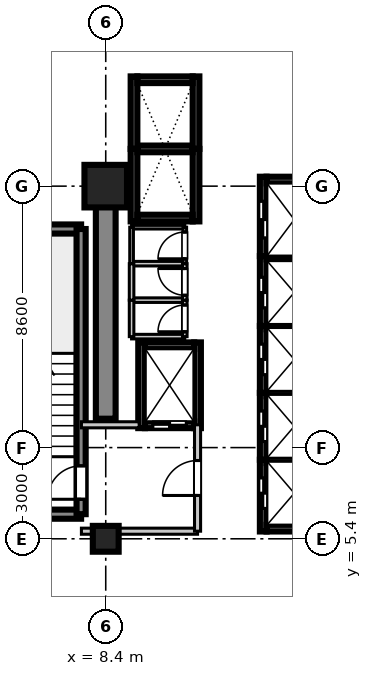
"""IFC4 building model, lengths in metres.
Left out: names, types, materials, properties, quantities, classifications, styles, units other than length and angle.
Written with IfcOpenShell. Run it as: python <this file> out.ifc"""

import sys

from ifc_helpers import new_model, si_unit, direction, frame, frame_2d, origin, origin_2d, place, context, subcontext, project, spatial, rectangle, extrude, source, transform, mapped, element, fill, save


model = new_model("IFC4")
c1 = context("Model", 3, precision=1e-05, world=origin(), true_north=direction((0.0, 1.0)))
c2 = subcontext(c1, "Body", "Model", "MODEL_VIEW")
j1 = project(units=[si_unit("LENGTHUNIT", "METRE"), si_unit("PLANEANGLEUNIT", "RADIAN")], contexts=[c1])
p1 = place(None, origin())
s1 = spatial("IfcSite", under=j1, at=p1, CompositionType="ELEMENT")
p2 = place(p1, origin())
s2 = spatial("IfcBuilding", under=s1, at=p2, CompositionType="ELEMENT")
p3 = place(p2, frame((0.0, 0.0, 76.2)))
s3 = spatial("IfcBuildingStorey", under=s2, at=p3, CompositionType="ELEMENT", Elevation=76.2)
m1 = source(origin(), c2, "Body", "SweptSolid", [
    extrude(rectangle(XDim=0.85, YDim=0.85, at=origin_2d()), origin(), (0.0, 0.0, 1.0), 3.605),
])
p4 = place(p3, frame((8.4, 5.4, 0.0), z_axis=(0.0, 0.0, 1.0), x_axis=(1.0, 0.0, 0.0)))
e1 = element("IfcColumn", 1, at=p4, inside=s3, PredefinedType="PILASTER", context=c2, shape_type="MappedRepresentation", body=[
    mapped(m1, transform((0.0, 0.0, 0.0), scale=1.0)),
])
m2 = source(origin(), c2, "Body", "SweptSolid", [
    extrude(rectangle(XDim=1.4, YDim=1.4, at=origin_2d()), origin(), (0.0, 0.0, 1.0), 3.605),
])
p5 = place(p3, frame((8.4, 17.0, 0.0), z_axis=(0.0, 0.0, 1.0), x_axis=(1.0, 0.0, 0.0)))
e2 = element("IfcColumn", 2, at=p5, inside=s3, PredefinedType="COLUMN", context=c2, shape_type="MappedRepresentation", body=[
    mapped(m2, transform((0.0, 0.0, 0.0), scale=1.0)),
])
m3 = source(origin(), c2, "Body", "SweptSolid", [
    extrude(rectangle(XDim=7.65, YDim=0.65, at=frame_2d((3.825, 0.0))), origin(), (0.0, 0.0, 1.0), 3.37),
])
p6 = place(p3, frame((8.4, 9.35, 0.0), z_axis=(0.0, 0.0, 1.0), x_axis=(0.0, 1.0, 0.0)))
e3 = element("IfcWall", 3, at=p6, inside=s3, PredefinedType="SHEAR", context=c2, shape_type="MappedRepresentation", body=[
    mapped(m3, transform((0.0, 0.0, 0.0), scale=1.0)),
])
m4 = source(origin(), c2, "Body", "SweptSolid", [
    extrude(rectangle(XDim=3.98, YDim=0.3, at=frame_2d((1.99, 0.0))), origin(), (0.0, 0.0, 1.0), 3.37),
])
for number, where, z_axis, x_axis in (
    (4, (3.61, 6.21, 0.0), (0.0, 0.0, 1.0), (1.0, 0.0, 0.0)),
    (5, (3.61, 15.59, 0.0), (0.0, 0.0, 1.0), (1.0, 0.0, 0.0)),
):
    element("IfcWall", number, at=place(p3, frame(where, z_axis=z_axis, x_axis=x_axis)), inside=s3, PredefinedType="SHEAR", context=c2, shape_type="MappedRepresentation", body=[
        mapped(m4, transform((0.0, 0.0, 0.0), scale=1.0)),
    ])
m5 = source(origin(), c2, "Body", "SweptSolid", [
    extrude(rectangle(XDim=9.38, YDim=0.3, at=frame_2d((4.69, 0.0))), origin(), (0.0, 0.0, 1.0), 3.37),
])
p7 = place(p3, frame((7.59, 6.21, 0.0), z_axis=(0.0, 0.0, 1.0), x_axis=(0.0, 1.0, 0.0)))
e6 = element("IfcWall", 6, at=p7, inside=s3, PredefinedType="SHEAR", context=c2, shape_type="MappedRepresentation", body=[
    mapped(m5, transform((0.0, 0.0, 0.0), scale=1.0)),
])
p8 = place(p7, frame((0.49, 0.0, 0.0)))
e7 = element("IfcOpeningElement", 7, at=p8, cuts=e6, PredefinedType="OPENING", context=c2, shape_type="SweptSolid", body=[
    extrude(rectangle(XDim=1.1, YDim=2.15, at=frame_2d((0.55, 1.075))), frame((0.0, 0.16, 0.0), z_axis=(0.0, -1.0, 0.0), x_axis=(1.0, 0.0, 0.0)), (0.0, 0.0, 1.0), 0.32),
])
m6 = source(origin(), c2, "Body", "SweptSolid", [
    extrude(rectangle(XDim=2.36, YDim=0.22, at=frame_2d((1.18, 0.0))), origin(), (0.0, 0.0, 1.0), 3.37),
])
p9 = place(p3, frame((13.58, 5.64, 0.0), z_axis=(0.0, 0.0, 1.0), x_axis=(0.0, 1.0, 0.0)))
e8 = element("IfcWall", 8, at=p9, inside=s3, PredefinedType="SHEAR", context=c2, shape_type="MappedRepresentation", body=[
    mapped(m6, transform((0.0, 0.0, 0.0), scale=1.0)),
])
p10 = place(p9, frame((0.76, 0.0, 0.0)))
e9 = element("IfcOpeningElement", 9, at=p10, cuts=e8, PredefinedType="OPENING", context=c2, shape_type="SweptSolid", body=[
    extrude(rectangle(XDim=1.0, YDim=2.2, at=frame_2d((0.5, 1.1))), frame((0.0, 0.12, 0.0), z_axis=(0.0, -1.0, 0.0), x_axis=(1.0, 0.0, 0.0)), (0.0, 0.0, 1.0), 0.24),
])
m7 = source(origin(), c2, "Body", "SweptSolid", [
    extrude(rectangle(XDim=1.82, YDim=0.22, at=frame_2d((0.91, 0.0))), origin(), (0.0, 0.0, 1.0), 3.37),
])
p11 = place(p3, frame((13.69, 5.75, 0.0), z_axis=(0.0, 0.0, 1.0), x_axis=(1.0, 0.0, 0.0)))
e10 = element("IfcWall", 10, at=p11, inside=s3, PredefinedType="SHEAR", context=c2, shape_type="MappedRepresentation", body=[
    mapped(m7, transform((0.0, 0.0, 0.0), scale=1.0)),
])
m8 = source(origin(), c2, "Body", "SweptSolid", [
    extrude(rectangle(XDim=1.82, YDim=0.22, at=frame_2d((0.91, 0.0))), origin(), (0.0, 0.0, 1.0), 3.65),
])
p12 = place(p3, frame((13.69, 8.0, 0.0), z_axis=(0.0, 0.0, 1.0), x_axis=(1.0, 0.0, 0.0)))
e11 = element("IfcWall", 11, at=p12, inside=s3, PredefinedType="SHEAR", context=c2, shape_type="MappedRepresentation", body=[
    mapped(m8, transform((0.0, 0.0, 0.0), scale=1.0)),
])
m9 = source(origin(), c2, "Body", "SweptSolid", [
    extrude(rectangle(XDim=2.2, YDim=0.22, at=frame_2d((1.1, 0.0))), origin(), (0.0, 0.0, 1.0), 3.37),
])
p13 = place(p3, frame((13.58, 8.0, 0.0), z_axis=(0.0, 0.0, 1.0), x_axis=(0.0, 1.0, 0.0)))
e12 = element("IfcWall", 12, at=p13, inside=s3, PredefinedType="SHEAR", context=c2, shape_type="MappedRepresentation", body=[
    mapped(m9, transform((0.0, 0.0, 0.0), scale=1.0)),
])
p14 = place(p13, frame((0.6, 0.0, 0.0)))
e13 = element("IfcOpeningElement", 13, at=p14, cuts=e12, PredefinedType="OPENING", context=c2, shape_type="SweptSolid", body=[
    extrude(rectangle(XDim=1.0, YDim=2.2, at=frame_2d((0.5, 1.1))), frame((0.0, 0.12, 0.0), z_axis=(0.0, -1.0, 0.0), x_axis=(1.0, 0.0, 0.0)), (0.0, 0.0, 1.0), 0.24),
])
p15 = place(p3, frame((13.69, 10.2, 0.0), z_axis=(0.0, 0.0, 1.0), x_axis=(1.0, 0.0, 0.0)))
e14 = element("IfcWall", 14, at=p15, inside=s3, PredefinedType="SHEAR", context=c2, shape_type="MappedRepresentation", body=[
    mapped(m8, transform((0.0, 0.0, 0.0), scale=1.0)),
])
p16 = place(p3, frame((13.58, 10.2, 0.0), z_axis=(0.0, 0.0, 1.0), x_axis=(0.0, 1.0, 0.0)))
e15 = element("IfcWall", 15, at=p16, inside=s3, PredefinedType="SHEAR", context=c2, shape_type="MappedRepresentation", body=[
    mapped(m9, transform((0.0, 0.0, 0.0), scale=1.0)),
])
p17 = place(p16, frame((0.6, 0.0, 0.0)))
e16 = element("IfcOpeningElement", 16, at=p17, cuts=e15, PredefinedType="OPENING", context=c2, shape_type="SweptSolid", body=[
    extrude(rectangle(XDim=1.0, YDim=2.2, at=frame_2d((0.5, 1.1))), frame((0.0, 0.12, 0.0), z_axis=(0.0, -1.0, 0.0), x_axis=(1.0, 0.0, 0.0)), (0.0, 0.0, 1.0), 0.24),
])
p18 = place(p3, frame((13.69, 12.4, 0.0), z_axis=(0.0, 0.0, 1.0), x_axis=(1.0, 0.0, 0.0)))
e17 = element("IfcWall", 17, at=p18, inside=s3, PredefinedType="SHEAR", context=c2, shape_type="MappedRepresentation", body=[
    mapped(m8, transform((0.0, 0.0, 0.0), scale=1.0)),
])
m10 = source(origin(), c2, "Body", "SweptSolid", [
    extrude(rectangle(XDim=2.3, YDim=0.22, at=frame_2d((1.15, 0.0))), origin(), (0.0, 0.0, 1.0), 3.37),
])
p19 = place(p3, frame((13.58, 12.4, 0.0), z_axis=(0.0, 0.0, 1.0), x_axis=(0.0, 1.0, 0.0)))
e18 = element("IfcWall", 18, at=p19, inside=s3, PredefinedType="SHEAR", context=c2, shape_type="MappedRepresentation", body=[
    mapped(m10, transform((0.0, 0.0, 0.0), scale=1.0)),
])
p20 = place(p19, frame((0.6, 0.0, 0.0)))
e19 = element("IfcOpeningElement", 19, at=p20, cuts=e18, PredefinedType="OPENING", context=c2, shape_type="SweptSolid", body=[
    extrude(rectangle(XDim=1.0, YDim=2.2, at=frame_2d((0.5, 1.1))), frame((0.0, 0.12, 0.0), z_axis=(0.0, -1.0, 0.0), x_axis=(1.0, 0.0, 0.0)), (0.0, 0.0, 1.0), 0.24),
])
p21 = place(p3, frame((13.69, 14.7, 0.0), z_axis=(0.0, 0.0, 1.0), x_axis=(1.0, 0.0, 0.0)))
e20 = element("IfcWall", 20, at=p21, inside=s3, PredefinedType="SHEAR", context=c2, shape_type="MappedRepresentation", body=[
    mapped(m8, transform((0.0, 0.0, 0.0), scale=1.0)),
])
m11 = source(origin(), c2, "Body", "SweptSolid", [
    extrude(rectangle(XDim=2.385, YDim=0.22, at=frame_2d((1.192, 0.0))), origin(), (0.0, 0.0, 1.0), 3.37),
])
for number, where, z_axis, x_axis in (
    (21, (9.33, 15.84, 0.0), (0.0, 0.0, 1.0), (0.0, 1.0, 0.0)),
    (22, (11.37, 15.84, 0.0), (0.0, 0.0, 1.0), (0.0, 1.0, 0.0)),
):
    element("IfcWall", number, at=place(p3, frame(where, z_axis=z_axis, x_axis=x_axis)), inside=s3, PredefinedType="SHEAR", context=c2, shape_type="MappedRepresentation", body=[
        mapped(m11, transform((0.0, 0.0, 0.0), scale=1.0)),
    ])
p22 = place(p3, frame((9.44, 15.95, 0.0), z_axis=(0.0, 0.0, 1.0), x_axis=(1.0, 0.0, 0.0)))
e23 = element("IfcWall", 23, at=p22, inside=s3, PredefinedType="SHEAR", context=c2, shape_type="MappedRepresentation", body=[
    mapped(m7, transform((0.0, 0.0, 0.0), scale=1.0)),
])
p23 = place(p3, frame((9.44, 18.225, 0.0), z_axis=(0.0, 0.0, 1.0), x_axis=(1.0, 0.0, 0.0)))
e24 = element("IfcWall", 24, at=p23, inside=s3, PredefinedType="SHEAR", context=c2, shape_type="MappedRepresentation", body=[
    mapped(m8, transform((0.0, 0.0, 0.0), scale=1.0)),
])
for number, where, z_axis, x_axis in (
    (25, (9.33, 18.225, 0.0), (0.0, 0.0, 1.0), (0.0, 1.0, 0.0)),
    (26, (11.37, 18.225, 0.0), (0.0, 0.0, 1.0), (0.0, 1.0, 0.0)),
):
    element("IfcWall", number, at=place(p3, frame(where, z_axis=z_axis, x_axis=x_axis)), inside=s3, PredefinedType="SHEAR", context=c2, shape_type="MappedRepresentation", body=[
        mapped(m11, transform((0.0, 0.0, 0.0), scale=1.0)),
    ])
p24 = place(p3, frame((9.44, 20.5, 0.0), z_axis=(0.0, 0.0, 1.0), x_axis=(1.0, 0.0, 0.0)))
e27 = element("IfcWall", 27, at=p24, inside=s3, PredefinedType="SHEAR", context=c2, shape_type="MappedRepresentation", body=[
    mapped(m7, transform((0.0, 0.0, 0.0), scale=1.0)),
])
m12 = source(origin(), c2, "Body", "SweptSolid", [
    extrude(rectangle(XDim=2.82, YDim=0.22, at=frame_2d((1.41, 0.0))), origin(), (0.0, 0.0, 1.0), 3.37),
])
for number, where, z_axis, x_axis in (
    (28, (9.58, 9.04, 0.0), (0.0, 0.0, 1.0), (0.0, 1.0, 0.0)),
    (29, (11.42, 9.04, 0.0), (0.0, 0.0, 1.0), (0.0, 1.0, 0.0)),
):
    element("IfcWall", number, at=place(p3, frame(where, z_axis=z_axis, x_axis=x_axis)), inside=s3, PredefinedType="SHEAR", context=c2, shape_type="MappedRepresentation", body=[
        mapped(m12, transform((0.0, 0.0, 0.0), scale=1.0)),
    ])
m13 = source(origin(), c2, "Body", "SweptSolid", [
    extrude(rectangle(XDim=1.62, YDim=0.22, at=frame_2d((0.81, 0.0))), origin(), (0.0, 0.0, 1.0), 3.37),
])
p25 = place(p3, frame((9.69, 9.15, 0.0), z_axis=(0.0, 0.0, 1.0), x_axis=(1.0, 0.0, 0.0)))
e30 = element("IfcWall", 30, at=p25, inside=s3, PredefinedType="SHEAR", context=c2, shape_type="MappedRepresentation", body=[
    mapped(m13, transform((0.0, 0.0, 0.0), scale=1.0)),
])
p26 = place(p25, frame((0.26, 0.0, 0.0)))
e31 = element("IfcOpeningElement", 31, at=p26, cuts=e30, PredefinedType="OPENING", context=c2, shape_type="SweptSolid", body=[
    extrude(rectangle(XDim=1.1, YDim=2.2, at=frame_2d((0.55, 1.1))), frame((0.0, 0.12, 0.0), z_axis=(0.0, -1.0, 0.0), x_axis=(1.0, 0.0, 0.0)), (0.0, 0.0, 1.0), 0.24),
])
p27 = place(p3, frame((9.69, 11.75, 0.0), z_axis=(0.0, 0.0, 1.0), x_axis=(1.0, 0.0, 0.0)))
e32 = element("IfcWall", 32, at=p27, inside=s3, PredefinedType="SHEAR", context=c2, shape_type="MappedRepresentation", body=[
    mapped(m13, transform((0.0, 0.0, 0.0), scale=1.0)),
])
m14 = source(origin(), c2, "Body", "SweptSolid", [
    extrude(rectangle(XDim=2.61, YDim=0.22, at=frame_2d((1.305, 0.0))), origin(), (0.0, 0.0, 1.0), 3.37),
])
p28 = place(p3, frame((13.58, 14.7, 0.0), z_axis=(0.0, 0.0, 1.0), x_axis=(0.0, 1.0, 0.0)))
e33 = element("IfcWall", 33, at=p28, inside=s3, PredefinedType="SHEAR", context=c2, shape_type="MappedRepresentation", body=[
    mapped(m14, transform((0.0, 0.0, 0.0), scale=1.0)),
])
p29 = place(p28, frame((0.6, 0.0, 0.0)))
e34 = element("IfcOpeningElement", 34, at=p29, cuts=e33, PredefinedType="OPENING", context=c2, shape_type="SweptSolid", body=[
    extrude(rectangle(XDim=1.2, YDim=2.2, at=frame_2d((0.6, 1.1))), frame((0.0, 0.12, 0.0), z_axis=(0.0, -1.0, 0.0), x_axis=(1.0, 0.0, 0.0)), (0.0, 0.0, 1.0), 0.24),
])
p30 = place(p3, frame((13.69, 17.2, 0.0), z_axis=(0.0, 0.0, 1.0), x_axis=(1.0, 0.0, 0.0)))
e35 = element("IfcWall", 35, at=p30, inside=s3, PredefinedType="SHEAR", context=c2, shape_type="MappedRepresentation", body=[
    mapped(m7, transform((0.0, 0.0, 0.0), scale=1.0)),
])
m15 = source(origin(), c2, "Body", "SweptSolid", [
    extrude(rectangle(XDim=3.82, YDim=0.2, at=frame_2d((1.91, 0.0))), origin(), (0.0, 0.0, 1.0), 2.71),
])
p31 = place(p3, frame((7.6, 5.65, 0.0), z_axis=(0.0, 0.0, 1.0), x_axis=(1.0, 0.0, 0.0)))
e36 = element("IfcWall", 36, at=p31, inside=s3, PredefinedType="PARTITIONING", context=c2, shape_type="MappedRepresentation", body=[
    mapped(m15, transform((0.0, 0.0, 0.0), scale=1.0)),
])
m16 = source(origin(), c2, "Body", "SweptSolid", [
    extrude(rectangle(XDim=1.9, YDim=0.2, at=frame_2d((0.95, 0.0))), origin(), (0.0, 0.0, 1.0), 2.71),
])
p32 = place(p3, frame((7.6, 9.15, 0.0), z_axis=(0.0, 0.0, 1.0), x_axis=(1.0, 0.0, 0.0)))
e37 = element("IfcWall", 37, at=p32, inside=s3, PredefinedType="PARTITIONING", context=c2, shape_type="MappedRepresentation", body=[
    mapped(m16, transform((0.0, 0.0, 0.0), scale=1.0)),
])
m17 = source(origin(), c2, "Body", "SweptSolid", [
    extrude(rectangle(XDim=3.5, YDim=0.2, at=frame_2d((1.75, 0.0))), origin(), (0.0, 0.0, 1.0), 2.71),
])
p33 = place(p3, frame((11.42, 5.65, 0.0), z_axis=(0.0, 0.0, 1.0), x_axis=(0.0, 1.0, 0.0)))
e38 = element("IfcWall", 38, at=p33, inside=s3, PredefinedType="PARTITIONING", context=c2, shape_type="MappedRepresentation", body=[
    mapped(m17, transform((0.0, 0.0, 0.0), scale=1.0)),
])
p34 = place(p33, frame((1.175, 0.0, 0.0)))
e39 = element("IfcOpeningElement", 39, at=p34, cuts=e38, PredefinedType="OPENING", context=c2, shape_type="SweptSolid", body=[
    extrude(rectangle(XDim=1.15, YDim=2.15, at=frame_2d((0.575, 1.075))), frame((0.0, 0.11, 0.0), z_axis=(0.0, -1.0, 0.0), x_axis=(1.0, 0.0, 0.0)), (0.0, 0.0, 1.0), 0.22),
])
m18 = source(origin(), c2, "Body", "SweptSolid", [
    extrude(rectangle(XDim=1.75, YDim=0.15, at=frame_2d((0.875, 0.0))), origin(), (0.0, 0.0, 1.0), 2.71),
])
for number, where, z_axis, x_axis in (
    (40, (9.25, 12.05, 0.0), (0.0, 0.0, 1.0), (1.0, 0.0, 0.0)),
    (41, (9.25, 13.25, 0.0), (0.0, 0.0, 1.0), (1.0, 0.0, 0.0)),
):
    element("IfcWall", number, at=place(p3, frame(where, z_axis=z_axis, x_axis=x_axis)), inside=s3, PredefinedType="PARTITIONING", context=c2, shape_type="MappedRepresentation", body=[
        mapped(m18, transform((0.0, 0.0, 0.0), scale=1.0)),
    ])
m19 = source(origin(), c2, "Body", "SweptSolid", [
    extrude(rectangle(XDim=1.2, YDim=0.15, at=frame_2d((0.6, 0.0))), origin(), (0.0, 0.0, 1.0), 2.71),
])
p35 = place(p3, frame((9.25, 12.05, 0.0), z_axis=(0.0, 0.0, 1.0), x_axis=(0.0, 1.0, 0.0)))
e42 = element("IfcWall", 42, at=p35, inside=s3, PredefinedType="PARTITIONING", context=c2, shape_type="MappedRepresentation", body=[
    mapped(m19, transform((0.0, 0.0, 0.0), scale=1.0)),
])
p36 = place(p3, frame((11.0, 12.05, 0.0), z_axis=(0.0, 0.0, 1.0), x_axis=(0.0, 1.0, 0.0)))
e43 = element("IfcWall", 43, at=p36, inside=s3, PredefinedType="PARTITIONING", context=c2, shape_type="MappedRepresentation", body=[
    mapped(m19, transform((0.0, 0.0, 0.0), scale=1.0)),
])
p37 = place(p36, frame((0.16, 0.0, 0.0)))
e44 = element("IfcOpeningElement", 44, at=p37, cuts=e43, PredefinedType="OPENING", context=c2, shape_type="SweptSolid", body=[
    extrude(rectangle(XDim=0.88, YDim=2.1, at=frame_2d((0.44, 1.05))), frame((0.0, 0.085, 0.0), z_axis=(0.0, -1.0, 0.0), x_axis=(1.0, 0.0, 0.0)), (0.0, 0.0, 1.0), 0.17),
])
p38 = place(p3, frame((9.25, 14.45, 0.0), z_axis=(0.0, 0.0, 1.0), x_axis=(1.0, 0.0, 0.0)))
e45 = element("IfcWall", 45, at=p38, inside=s3, PredefinedType="PARTITIONING", context=c2, shape_type="MappedRepresentation", body=[
    mapped(m18, transform((0.0, 0.0, 0.0), scale=1.0)),
])
p39 = place(p3, frame((9.25, 13.25, 0.0), z_axis=(0.0, 0.0, 1.0), x_axis=(0.0, 1.0, 0.0)))
e46 = element("IfcWall", 46, at=p39, inside=s3, PredefinedType="PARTITIONING", context=c2, shape_type="MappedRepresentation", body=[
    mapped(m19, transform((0.0, 0.0, 0.0), scale=1.0)),
])
p40 = place(p3, frame((11.0, 13.25, 0.0), z_axis=(0.0, 0.0, 1.0), x_axis=(0.0, 1.0, 0.0)))
e47 = element("IfcWall", 47, at=p40, inside=s3, PredefinedType="PARTITIONING", context=c2, shape_type="MappedRepresentation", body=[
    mapped(m19, transform((0.0, 0.0, 0.0), scale=1.0)),
])
p41 = place(p40, frame((0.16, 0.0, 0.0)))
e48 = element("IfcOpeningElement", 48, at=p41, cuts=e47, PredefinedType="OPENING", context=c2, shape_type="SweptSolid", body=[
    extrude(rectangle(XDim=0.88, YDim=2.1, at=frame_2d((0.44, 1.05))), frame((0.0, 0.085, 0.0), z_axis=(0.0, -1.0, 0.0), x_axis=(1.0, 0.0, 0.0)), (0.0, 0.0, 1.0), 0.17),
])
m20 = source(origin(), c2, "Body", "SweptSolid", [
    extrude(rectangle(XDim=1.75, YDim=0.12, at=frame_2d((0.875, 0.0))), origin(), (0.0, 0.0, 1.0), 2.71),
])
p42 = place(p3, frame((9.25, 15.65, 0.0), z_axis=(0.0, 0.0, 1.0), x_axis=(1.0, 0.0, 0.0)))
e49 = element("IfcWall", 49, at=p42, inside=s3, PredefinedType="PARTITIONING", context=c2, shape_type="MappedRepresentation", body=[
    mapped(m20, transform((0.0, 0.0, 0.0), scale=1.0)),
])
m21 = source(origin(), c2, "Body", "SweptSolid", [
    extrude(rectangle(XDim=1.2, YDim=0.12, at=frame_2d((0.6, 0.0))), origin(), (0.0, 0.0, 1.0), 2.71),
])
p43 = place(p3, frame((9.25, 14.45, 0.0), z_axis=(0.0, 0.0, 1.0), x_axis=(0.0, 1.0, 0.0)))
e50 = element("IfcWall", 50, at=p43, inside=s3, PredefinedType="PARTITIONING", context=c2, shape_type="MappedRepresentation", body=[
    mapped(m21, transform((0.0, 0.0, 0.0), scale=1.0)),
])
p44 = place(p3, frame((11.0, 14.45, 0.0), z_axis=(0.0, 0.0, 1.0), x_axis=(0.0, 1.0, 0.0)))
e51 = element("IfcWall", 51, at=p44, inside=s3, PredefinedType="PARTITIONING", context=c2, shape_type="MappedRepresentation", body=[
    mapped(m21, transform((0.0, 0.0, 0.0), scale=1.0)),
])
p45 = place(p44, frame((0.16, 0.0, 0.0)))
e52 = element("IfcOpeningElement", 52, at=p45, cuts=e51, PredefinedType="OPENING", context=c2, shape_type="SweptSolid", body=[
    extrude(rectangle(XDim=0.88, YDim=2.1, at=frame_2d((0.44, 1.05))), frame((0.0, 0.07, 0.0), z_axis=(0.0, -1.0, 0.0), x_axis=(1.0, 0.0, 0.0)), (0.0, 0.0, 1.0), 0.14),
])
m22 = source(origin(), c2, "Body", "SweptSolid", [
    extrude(rectangle(XDim=1.1, YDim=2.15, at=frame_2d((0.55, 1.075))), frame((0.0, 0.025, 0.0), z_axis=(0.0, -1.0, 0.0), x_axis=(1.0, 0.0, 0.0)), (0.0, 0.0, 1.0), 0.05),
])
p46 = place(p8, origin())
e53 = element("IfcDoor", 53, at=p46, inside=s3, OperationType="SINGLE_SWING_LEFT", PredefinedType="DOOR", context=c2, shape_type="MappedRepresentation", body=[
    mapped(m22, transform((0.0, 0.0, 0.0), scale=1.0)),
])
fill(e7, e53)
m23 = source(origin(), c2, "Body", "SweptSolid", [
    extrude(rectangle(XDim=1.0, YDim=2.2, at=frame_2d((0.5, 1.1))), frame((0.0, 0.025, 0.0), z_axis=(0.0, -1.0, 0.0), x_axis=(1.0, 0.0, 0.0)), (0.0, 0.0, 1.0), 0.05),
])
p47 = place(p10, origin())
e54 = element("IfcDoor", 54, at=p47, inside=s3, OperationType="DOUBLE_DOOR_SLIDING", PredefinedType="DOOR", context=c2, shape_type="MappedRepresentation", body=[
    mapped(m23, transform((0.0, 0.0, 0.0), scale=1.0)),
])
fill(e9, e54)
p48 = place(p14, origin())
e55 = element("IfcDoor", 55, at=p48, inside=s3, OperationType="DOUBLE_DOOR_SLIDING", PredefinedType="DOOR", context=c2, shape_type="MappedRepresentation", body=[
    mapped(m23, transform((0.0, 0.0, 0.0), scale=1.0)),
])
fill(e13, e55)
p49 = place(p17, origin())
e56 = element("IfcDoor", 56, at=p49, inside=s3, OperationType="DOUBLE_DOOR_SLIDING", PredefinedType="DOOR", context=c2, shape_type="MappedRepresentation", body=[
    mapped(m23, transform((0.0, 0.0, 0.0), scale=1.0)),
])
fill(e16, e56)
p50 = place(p20, origin())
e57 = element("IfcDoor", 57, at=p50, inside=s3, OperationType="DOUBLE_DOOR_SLIDING", PredefinedType="DOOR", context=c2, shape_type="MappedRepresentation", body=[
    mapped(m23, transform((0.0, 0.0, 0.0), scale=1.0)),
])
fill(e19, e57)
m24 = source(origin(), c2, "Body", "SweptSolid", [
    extrude(rectangle(XDim=1.1, YDim=2.2, at=frame_2d((0.55, 1.1))), frame((0.0, 0.025, 0.0), z_axis=(0.0, -1.0, 0.0), x_axis=(1.0, 0.0, 0.0)), (0.0, 0.0, 1.0), 0.05),
])
p51 = place(p26, frame((1.1, 0.0, 0.0), z_axis=(0.0, 0.0, 1.0), x_axis=(-1.0, 0.0, 0.0)))
e58 = element("IfcDoor", 58, at=p51, inside=s3, OperationType="DOUBLE_DOOR_SLIDING", PredefinedType="DOOR", context=c2, shape_type="MappedRepresentation", body=[
    mapped(m24, transform((0.0, 0.0, 0.0), scale=1.0)),
])
fill(e31, e58)
m25 = source(origin(), c2, "Body", "SweptSolid", [
    extrude(rectangle(XDim=1.2, YDim=2.2, at=frame_2d((0.6, 1.1))), frame((0.0, 0.025, 0.0), z_axis=(0.0, -1.0, 0.0), x_axis=(1.0, 0.0, 0.0)), (0.0, 0.0, 1.0), 0.05),
])
p52 = place(p29, origin())
e59 = element("IfcDoor", 59, at=p52, inside=s3, OperationType="DOUBLE_DOOR_SLIDING", PredefinedType="DOOR", context=c2, shape_type="MappedRepresentation", body=[
    mapped(m25, transform((0.0, 0.0, 0.0), scale=1.0)),
])
fill(e34, e59)
m26 = source(origin(), c2, "Body", "SweptSolid", [
    extrude(rectangle(XDim=1.15, YDim=2.15, at=frame_2d((0.575, 1.075))), frame((0.0, 0.025, 0.0), z_axis=(0.0, -1.0, 0.0), x_axis=(1.0, 0.0, 0.0)), (0.0, 0.0, 1.0), 0.05),
])
p53 = place(p34, frame((1.15, 0.0, 0.0), z_axis=(0.0, 0.0, 1.0), x_axis=(-1.0, 0.0, 0.0)))
e60 = element("IfcDoor", 60, at=p53, inside=s3, OperationType="SINGLE_SWING_LEFT", PredefinedType="DOOR", context=c2, shape_type="MappedRepresentation", body=[
    mapped(m26, transform((0.0, 0.0, 0.0), scale=1.0)),
])
fill(e39, e60)
m27 = source(origin(), c2, "Body", "SweptSolid", [
    extrude(rectangle(XDim=0.88, YDim=2.1, at=frame_2d((0.44, 1.05))), frame((0.0, 0.025, 0.0), z_axis=(0.0, -1.0, 0.0), x_axis=(1.0, 0.0, 0.0)), (0.0, 0.0, 1.0), 0.05),
])
p54 = place(p37, origin())
e61 = element("IfcDoor", 61, at=p54, inside=s3, OperationType="SINGLE_SWING_LEFT", PredefinedType="DOOR", context=c2, shape_type="MappedRepresentation", body=[
    mapped(m27, transform((0.0, 0.0, 0.0), scale=1.0)),
])
fill(e44, e61)
p55 = place(p41, origin())
e62 = element("IfcDoor", 62, at=p55, inside=s3, OperationType="SINGLE_SWING_RIGHT", PredefinedType="DOOR", context=c2, shape_type="MappedRepresentation", body=[
    mapped(m27, transform((0.0, 0.0, 0.0), scale=1.0)),
])
fill(e48, e62)
p56 = place(p45, origin())
e63 = element("IfcDoor", 63, at=p56, inside=s3, OperationType="SINGLE_SWING_LEFT", PredefinedType="DOOR", context=c2, shape_type="MappedRepresentation", body=[
    mapped(m27, transform((0.0, 0.0, 0.0), scale=1.0)),
])
fill(e52, e63)
save(model, sys.argv[1])
